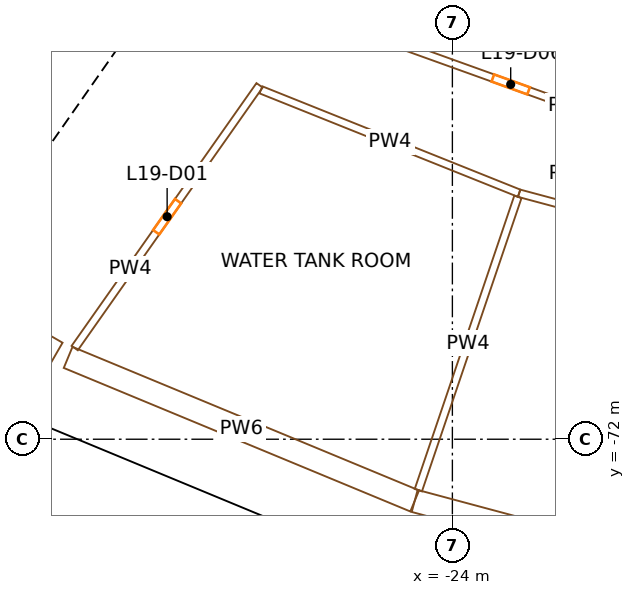
"""IFC4 building model, lengths in metres.
Left out: names, types, materials, properties, quantities, classifications, styles, units other than length and angle.
Written with IfcOpenShell. Run it as: python <this file> out.ifc"""

import sys

from ifc_helpers import new_model, si_unit, direction, frame, frame_2d, origin, origin_2d, place, context, subcontext, project, spatial, rectangle, extrude, element, fill, save


model = new_model("IFC4")
c1 = context("Model", 3, precision=1e-05, world=origin(), true_north=direction((0.0, 1.0)))
c2 = subcontext(c1, "Body", "Model", "MODEL_VIEW")
j1 = project(units=[si_unit("LENGTHUNIT", "METRE"), si_unit("PLANEANGLEUNIT", "RADIAN")], contexts=[c1])
p1 = place(None, origin())
s1 = spatial("IfcSite", under=j1, at=p1, CompositionType="ELEMENT")
p2 = place(p1, origin())
s2 = spatial("IfcBuilding", under=s1, at=p2, CompositionType="ELEMENT")
p3 = place(p2, frame((0.0, 0.0, 89.9)))
s3 = spatial("IfcBuildingStorey", under=s2, at=p3, CompositionType="ELEMENT", Elevation=89.9)
for number, where, z_axis, x_axis in (
    (1, (-34.388, -69.732, 0.0), (0.0, 0.0, 1.0), (0.897, -0.442, 0.0)),
    (2, (-24.992, -73.624, 0.0), (0.0, 0.0, 1.0), (0.947, -0.321, 0.0)),
):
    element("IfcColumn", number, at=place(p3, frame(where, z_axis=z_axis, x_axis=x_axis)), inside=s3, PredefinedType="COLUMN", context=c2, shape_type="SweptSolid", body=[
        extrude(rectangle(XDim=1.3, YDim=1.7, at=origin_2d()), origin(), (0.0, 0.0, 1.0), 5.0),
    ])
p4 = place(p3, frame((-36.717, -66.337, 0.0), z_axis=(0.0, 0.0, 1.0), x_axis=(0.573577477574, 0.819151315216, 0.0)))
e3 = element("IfcWall", 3, at=p4, inside=s3, PredefinedType="SHEAR", context=c2, shape_type="SweptSolid", body=[
    extrude(rectangle(XDim=14.8, YDim=0.9, at=frame_2d((7.4, 0.0))), origin(), (0.0, 0.0, 1.0), 4.7),
])
p5 = place(p4, frame((6.2, 0.0, 0.0)))
e4 = element("IfcOpeningElement", 4, at=p5, cuts=e3, PredefinedType="OPENING", context=c2, shape_type="SweptSolid", body=[
    extrude(rectangle(XDim=2.4, YDim=2.1, at=frame_2d((1.2, 1.05))), frame((0.0, 0.46, 0.0), z_axis=(0.0, -1.0, 0.0), x_axis=(1.0, 0.0, 0.0)), (0.0, 0.0, 1.0), 0.92),
])
p6 = place(p3, frame((-35.093, -71.276, 0.0), z_axis=(0.0, 0.0, 1.0), x_axis=(0.923877173549, -0.382689127353, 0.0)))
e5 = element("IfcWall", 5, at=p6, inside=s3, PredefinedType="SOLIDWALL", context=c2, shape_type="SweptSolid", body=[
    extrude(rectangle(XDim=10.291, YDim=0.4, at=frame_2d((5.146, 0.0))), origin(), (0.0, 0.0, 1.0), 3.6),
])
p7 = place(p3, frame((-43.176, -64.658, 0.0), z_axis=(0.0, 0.0, 1.0), x_axis=(0.866037016931, -0.4999798849, 0.0)))
e6 = element("IfcWall", 6, at=p7, inside=s3, PredefinedType="PARTITIONING", context=c2, shape_type="SweptSolid", body=[
    extrude(rectangle(XDim=10.125, YDim=0.6, at=frame_2d((5.062, 0.0))), origin(), (0.0, 0.0, 1.0), 3.6),
])
p8 = place(p3, frame((-34.11, -69.847, 0.0), z_axis=(0.0, 0.0, 1.0), x_axis=(0.923883575944, -0.382673670509, 0.0)))
e7 = element("IfcWall", 7, at=p8, inside=s3, PredefinedType="PARTITIONING", context=c2, shape_type="SweptSolid", body=[
    extrude(rectangle(XDim=9.87, YDim=0.6, at=frame_2d((4.935, 0.0))), origin(), (0.0, 0.0, 1.0), 3.6),
])
p9 = place(p3, frame((-29.073, -62.688, 0.0), z_axis=(0.0, 0.0, 1.0), x_axis=(-0.575412564813, -0.817863301693, 0.0)))
e8 = element("IfcWall", 8, at=p9, inside=s3, PredefinedType="PARTITIONING", context=c2, shape_type="SweptSolid", body=[
    extrude(rectangle(XDim=8.454, YDim=0.2, at=frame_2d((4.227, 0.0))), origin(), (0.0, 0.0, 1.0), 3.6),
])
p10 = place(p9, frame((3.727, 0.0, 0.0)))
e9 = element("IfcOpeningElement", 9, at=p10, cuts=e8, PredefinedType="OPENING", context=c2, shape_type="SweptSolid", body=[
    extrude(rectangle(XDim=1.0, YDim=2.1, at=frame_2d((0.5, 1.05))), frame((0.0, 0.11, 0.0), z_axis=(0.0, -1.0, 0.0), x_axis=(1.0, 0.0, 0.0)), (0.0, 0.0, 1.0), 0.22),
])
p11 = place(p3, frame((-29.038, -62.807, 0.0), z_axis=(0.0, 0.0, 1.0), x_axis=(0.928338595819, -0.371735728056, 0.0)))
e10 = element("IfcWall", 10, at=p11, inside=s3, PredefinedType="PARTITIONING", context=c2, shape_type="SweptSolid", body=[
    extrude(rectangle(XDim=7.319, YDim=0.2, at=frame_2d((3.659, 0.0))), origin(), (0.0, 0.0, 1.0), 3.6),
])
p12 = place(p3, frame((-27.642, -60.804, 0.0), z_axis=(0.0, 0.0, 1.0), x_axis=(0.941100538557, -0.338126864251, 0.0)))
e11 = element("IfcWall", 11, at=p12, inside=s3, PredefinedType="PARTITIONING", context=c2, shape_type="SweptSolid", body=[
    extrude(rectangle(XDim=11.001, YDim=0.2, at=frame_2d((5.5, 0.0))), origin(), (0.0, 0.0, 1.0), 3.6),
])
p13 = place(p12, frame((5.0, 0.0, 0.0)))
e12 = element("IfcOpeningElement", 12, at=p13, cuts=e11, PredefinedType="OPENING", context=c2, shape_type="SweptSolid", body=[
    extrude(rectangle(XDim=1.0, YDim=2.1, at=frame_2d((0.5, 1.05))), frame((0.0, 0.11, 0.0), z_axis=(0.0, -1.0, 0.0), x_axis=(1.0, 0.0, 0.0)), (0.0, 0.0, 1.0), 0.22),
])
p14 = place(p3, frame((-24.896, -73.34, 0.0), z_axis=(0.0, 0.0, 1.0), x_axis=(0.321453202328, 0.946925466292, 0.0)))
e13 = element("IfcWall", 13, at=p14, inside=s3, PredefinedType="PARTITIONING", context=c2, shape_type="SweptSolid", body=[
    extrude(rectangle(XDim=8.15, YDim=0.2, at=frame_2d((4.075, 0.0))), origin(), (0.0, 0.0, 1.0), 3.6),
])
p15 = place(p3, frame((-24.992, -73.624, 0.0), z_axis=(0.0, 0.0, 1.0), x_axis=(0.965923565769, -0.258827481333, 0.0)))
e14 = element("IfcWall", 14, at=p15, inside=s3, PredefinedType="PARTITIONING", context=c2, shape_type="SweptSolid", body=[
    extrude(rectangle(XDim=10.147, YDim=0.6, at=frame_2d((5.074, 0.0))), origin(), (0.0, 0.0, 1.0), 3.6),
])
p16 = place(p3, frame((-13.51, -67.868, 0.0), z_axis=(0.0, 0.0, 1.0), x_axis=(-0.965925032209, 0.258822008631, 0.0)))
e15 = element("IfcWall", 15, at=p16, inside=s3, PredefinedType="PARTITIONING", context=c2, shape_type="SweptSolid", body=[
    extrude(rectangle(XDim=9.042, YDim=0.2, at=frame_2d((4.521, 0.0))), origin(), (0.0, 0.0, 1.0), 3.6),
])
p17 = place(p16, frame((3.621, 0.0, 0.0)))
e16 = element("IfcOpeningElement", 16, at=p17, cuts=e15, PredefinedType="OPENING", context=c2, shape_type="SweptSolid", body=[
    extrude(rectangle(XDim=1.8, YDim=2.4, at=frame_2d((0.9, 1.2))), frame((0.0, 0.11, 0.0), z_axis=(0.0, -1.0, 0.0), x_axis=(1.0, 0.0, 0.0)), (0.0, 0.0, 1.0), 0.22),
])
p18 = place(p10, origin())
e17 = element("IfcDoor", 17, at=p18, inside=s3, OperationType="SINGLE_SWING_RIGHT", PredefinedType="DOOR", context=c2, shape_type="SweptSolid", body=[
    extrude(rectangle(XDim=1.0, YDim=2.1, at=frame_2d((0.5, 1.05))), frame((0.0, 0.025, 0.0), z_axis=(0.0, -1.0, 0.0), x_axis=(1.0, 0.0, 0.0)), (0.0, 0.0, 1.0), 0.05),
])
fill(e9, e17)
p19 = place(p13, origin())
e18 = element("IfcDoor", 18, at=p19, inside=s3, OperationType="SINGLE_SWING_RIGHT", PredefinedType="DOOR", context=c2, shape_type="SweptSolid", body=[
    extrude(rectangle(XDim=1.0, YDim=2.1, at=frame_2d((0.5, 1.05))), frame((0.0, 0.025, 0.0), z_axis=(0.0, -1.0, 0.0), x_axis=(1.0, 0.0, 0.0)), (0.0, 0.0, 1.0), 0.05),
])
fill(e12, e18)
save(model, sys.argv[1])
